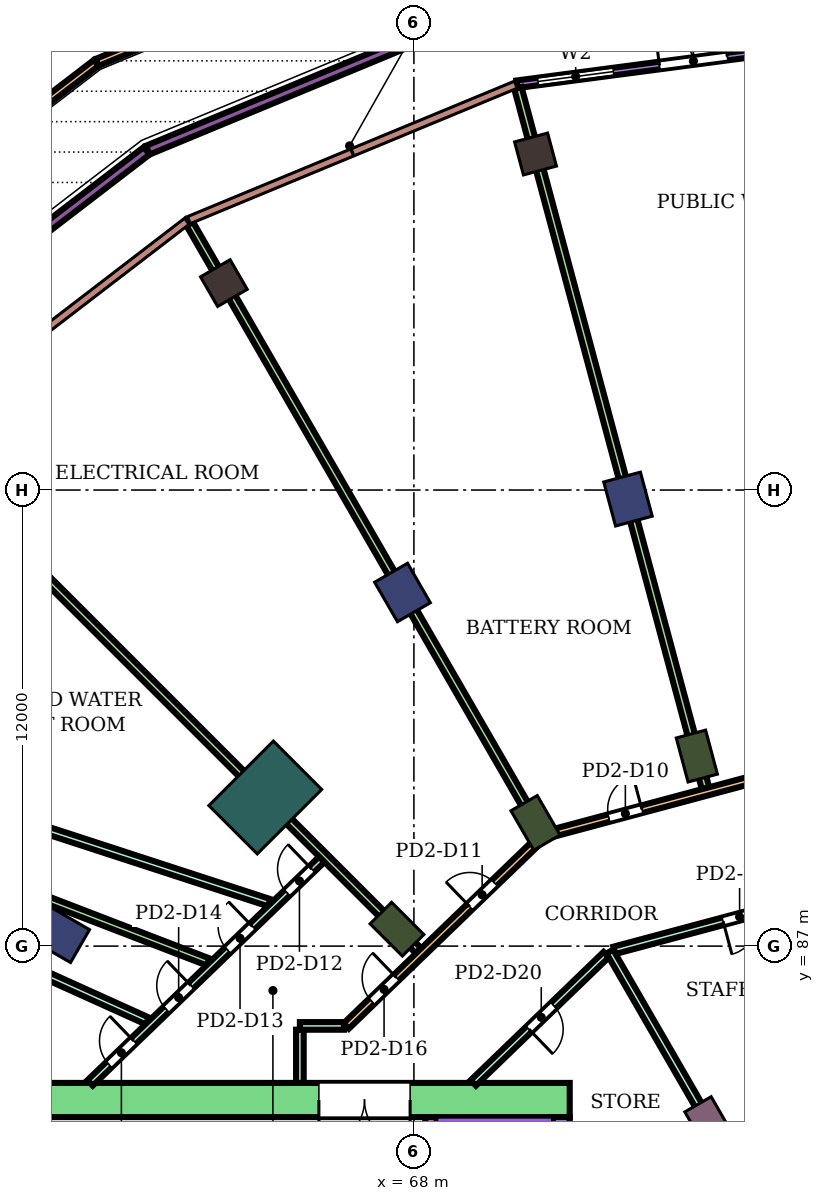
"""IFC4 building model, lengths in metres.
Left out: names, types, materials, properties, quantities, classifications, styles, units other than length and angle.
Written with IfcOpenShell. Run it as: python <this file> out.ifc"""

import sys

from ifc_helpers import new_model, si_unit, direction, frame, frame_2d, origin, origin_2d, place, context, subcontext, project, spatial, rectangle, extrude, element, fill, save


model = new_model("IFC4")
c1 = context("Model", 3, precision=1e-05, world=origin(), true_north=direction((0.0, 1.0)))
c2 = subcontext(c1, "Body", "Model", "MODEL_VIEW")
j1 = project(units=[si_unit("LENGTHUNIT", "METRE"), si_unit("PLANEANGLEUNIT", "RADIAN")], contexts=[c1])
p1 = place(None, origin())
s1 = spatial("IfcSite", under=j1, at=p1, CompositionType="ELEMENT")
p2 = place(p1, origin())
s2 = spatial("IfcBuilding", under=s1, at=p2, CompositionType="ELEMENT")
p3 = place(p2, frame((0.0, 0.0, 12.4)))
s3 = spatial("IfcBuildingStorey", under=s2, at=p3, CompositionType="ELEMENT", Elevation=12.4)
for number, where, z_axis, x_axis in (
    (1, (71.2, 107.842, 0.0), (0.0, 0.0, 1.0), (-0.259, 0.966, 0.0)),
    (2, (63.0, 104.445, 0.0), (0.0, 0.0, 1.0), (-0.5, 0.866, 0.0)),
):
    element("IfcColumn", number, at=place(p3, frame(where, z_axis=z_axis, x_axis=x_axis)), inside=s3, PredefinedType="COLUMN", context=c2, shape_type="SweptSolid", body=[
        extrude(rectangle(XDim=0.9, YDim=0.9, at=origin_2d()), origin(), (0.0, 0.0, 1.0), 5.4),
    ])
for number, where, z_axis, x_axis in (
    (3, (73.633, 98.762, 0.0), (0.0, 0.0, 1.0), (-0.259, 0.966, 0.0)),
    (4, (67.7, 96.304, 0.0), (0.0, 0.0, 1.0), (-0.5, 0.866, 0.0)),
    (5, (58.696, 87.3, 0.0), (0.0, 0.0, 1.0), (-0.866, 0.5, 0.0)),
):
    element("IfcColumn", number, at=place(p3, frame(where, z_axis=z_axis, x_axis=x_axis)), inside=s3, PredefinedType="COLUMN", context=c2, shape_type="SweptSolid", body=[
        extrude(rectangle(XDim=1.2, YDim=1.0, at=origin_2d()), origin(), (0.0, 0.0, 1.0), 5.4),
    ])
for number, where, z_axis, x_axis in (
    (6, (75.445, 92.0, 0.0), (0.0, 0.0, 1.0), (-0.259, 0.966, 0.0)),
    (7, (71.2, 90.242, 0.0), (0.0, 0.0, 1.0), (-0.5, 0.866, 0.0)),
    (8, (67.555, 87.445, 0.0), (0.0, 0.0, 1.0), (-0.707, 0.707, 0.0)),
):
    element("IfcColumn", number, at=place(p3, frame(where, z_axis=z_axis, x_axis=x_axis)), inside=s3, PredefinedType="COLUMN", context=c2, shape_type="SweptSolid", body=[
        extrude(rectangle(XDim=1.2, YDim=0.8, at=origin_2d()), origin(), (0.0, 0.0, 1.0), 5.4),
    ])
p4 = place(p3, frame((75.7, 82.448, 0.0), z_axis=(0.0, 0.0, 1.0), x_axis=(-0.5, 0.866025403784, 0.0)))
e9 = element("IfcColumn", 9, at=p4, inside=s3, PredefinedType="COLUMN", context=c2, shape_type="SweptSolid", body=[
    extrude(rectangle(XDim=0.9, YDim=0.8, at=origin_2d()), origin(), (0.0, 0.0, 1.0), 5.4),
])
p5 = place(p3, frame((64.09, 90.91, 0.0), z_axis=(0.0, 0.0, 1.0), x_axis=(-0.707106781187, 0.707106781187, 0.0)))
e10 = element("IfcColumn", 10, at=p5, inside=s3, PredefinedType="COLUMN", context=c2, shape_type="SweptSolid", body=[
    extrude(rectangle(XDim=1.8, YDim=2.4, at=origin_2d()), origin(), (0.0, 0.0, 1.0), 5.4),
])
p6 = place(p3, frame((72.1, 82.95, 0.0), z_axis=(0.0, 0.0, 1.0), x_axis=(-1.0, 0.0, 0.0)))
e11 = element("IfcWall", 11, at=p6, inside=s3, PredefinedType="SHEAR", context=c2, shape_type="SweptSolid", body=[
    extrude(rectangle(XDim=14.6, YDim=0.9, at=frame_2d((7.3, 0.0))), origin(), (0.0, 0.0, 1.0), 4.95),
])
p7 = place(p6, frame((4.2, 0.0, 0.0)))
e12 = element("IfcOpeningElement", 12, at=p7, cuts=e11, PredefinedType="OPENING", context=c2, shape_type="SweptSolid", body=[
    extrude(rectangle(XDim=2.4, YDim=2.4, at=frame_2d((1.2, 1.2))), frame((0.0, 0.46, 0.0), z_axis=(0.0, -1.0, 0.0), x_axis=(1.0, 0.0, 0.0)), (0.0, 0.0, 1.0), 0.92),
])
p8 = place(p3, frame((71.875, 82.5, 0.0), z_axis=(0.0, 0.0, 1.0), x_axis=(0.0, -1.0, 0.0)))
e13 = element("IfcWall", 13, at=p8, inside=s3, PredefinedType="SHEAR", context=c2, shape_type="SweptSolid", body=[
    extrude(rectangle(XDim=7.5, YDim=0.45, at=frame_2d((3.75, 0.0))), origin(), (0.0, 0.0, 1.0), 4.95),
])
p9 = place(p3, frame((68.45, 82.5, 0.0), z_axis=(0.0, 0.0, 1.0), x_axis=(0.0, -1.0, 0.0)))
e14 = element("IfcWall", 14, at=p9, inside=s3, PredefinedType="SHEAR", context=c2, shape_type="SweptSolid", body=[
    extrude(rectangle(XDim=7.5, YDim=0.3, at=frame_2d((3.75, 0.0))), origin(), (0.0, 0.0, 1.0), 4.95),
])
p10 = place(p9, frame((0.15, 0.0, 0.0)))
e15 = element("IfcOpeningElement", 15, at=p10, cuts=e14, PredefinedType="OPENING", context=c2, shape_type="SweptSolid", body=[
    extrude(rectangle(XDim=0.9, YDim=2.1, at=frame_2d((0.45, 1.05))), frame((0.0, 0.16, 0.0), z_axis=(0.0, -1.0, 0.0), x_axis=(1.0, 0.0, 0.0)), (0.0, 0.0, 1.0), 0.32),
])
p11 = place(p3, frame((80.0, 110.899, 0.0), z_axis=(0.0, 0.0, 1.0), x_axis=(-0.99144586971, -0.130518532918, 0.0)))
e16 = element("IfcWall", 16, at=p11, inside=s3, PredefinedType="NOTDEFINED", context=c2, shape_type="SweptSolid", body=[
    extrude(rectangle(XDim=9.371, YDim=0.2, at=frame_2d((4.686, 0.0))), origin(), (0.0, 0.0, 1.0), 5.4),
])
p12 = place(p11, frame((0.562, 0.0, 0.9)))
e17 = element("IfcOpeningElement", 17, at=p12, cuts=e16, PredefinedType="OPENING", context=c2, shape_type="SweptSolid", body=[
    extrude(rectangle(XDim=2.0, YDim=2.4, at=frame_2d((1.0, 1.2))), frame((0.0, 0.11, 0.0), z_axis=(0.0, -1.0, 0.0), x_axis=(1.0, 0.0, 0.0)), (0.0, 0.0, 1.0), 0.22),
])
p13 = place(p11, frame((3.786, 0.0, 0.0)))
e18 = element("IfcOpeningElement", 18, at=p13, cuts=e16, PredefinedType="OPENING", context=c2, shape_type="SweptSolid", body=[
    extrude(rectangle(XDim=1.8, YDim=2.4, at=frame_2d((0.9, 1.2))), frame((0.0, 0.11, 0.0), z_axis=(0.0, -1.0, 0.0), x_axis=(1.0, 0.0, 0.0)), (0.0, 0.0, 1.0), 0.22),
])
p14 = place(p11, frame((6.81, 0.0, 0.9)))
e19 = element("IfcOpeningElement", 19, at=p14, cuts=e16, PredefinedType="OPENING", context=c2, shape_type="SweptSolid", body=[
    extrude(rectangle(XDim=2.0, YDim=2.4, at=frame_2d((1.0, 1.2))), frame((0.0, 0.11, 0.0), z_axis=(0.0, -1.0, 0.0), x_axis=(1.0, 0.0, 0.0)), (0.0, 0.0, 1.0), 0.22),
])
p15 = place(p3, frame((80.0, 82.604, 0.0), z_axis=(0.0, 0.0, 1.0), x_axis=(-0.965933654434, -0.258789828301, 0.0)))
e20 = element("IfcWall", 20, at=p15, inside=s3, PredefinedType="NOTDEFINED", context=c2, shape_type="SweptSolid", body=[
    extrude(rectangle(XDim=3.936, YDim=0.2, at=frame_2d((1.968, 0.0))), origin(), (0.0, 0.0, 1.0), 5.4),
])
p16 = place(p15, frame((0.468, 0.0, 0.9)))
e21 = element("IfcOpeningElement", 21, at=p16, cuts=e20, PredefinedType="OPENING", context=c2, shape_type="SweptSolid", body=[
    extrude(rectangle(XDim=3.0, YDim=2.3, at=frame_2d((1.5, 1.15))), frame((0.0, 0.11, 0.0), z_axis=(0.0, -1.0, 0.0), x_axis=(1.0, 0.0, 0.0)), (0.0, 0.0, 1.0), 0.22),
])
p17 = place(p3, frame((51.233, 103.785, 0.0), z_axis=(0.0, 0.0, 1.0), x_axis=(0.793353052568, 0.608761803977, 0.0)))
e22 = element("IfcWall", 22, at=p17, inside=s3, PredefinedType="PARAPET", context=c2, shape_type="SweptSolid", body=[
    extrude(rectangle(XDim=10.598, YDim=0.2, at=frame_2d((5.299, 0.0))), origin(), (0.0, 0.0, 1.0), 1.1),
])
p18 = place(p3, frame((59.664, 110.25, 0.0), z_axis=(0.0, 0.0, 1.0), x_axis=(0.923876443197, 0.382690890544, 0.0)))
e23 = element("IfcWall", 23, at=p18, inside=s3, PredefinedType="PARAPET", context=c2, shape_type="SweptSolid", body=[
    extrude(rectangle(XDim=10.598, YDim=0.2, at=frame_2d((5.299, 0.0))), origin(), (0.0, 0.0, 1.0), 1.1),
])
p19 = place(p3, frame((53.107, 101.893, 0.0), z_axis=(0.0, 0.0, 1.0), x_axis=(0.793360504872, 0.608752091832, 0.0)))
e24 = element("IfcWall", 24, at=p19, inside=s3, PredefinedType="USERDEFINED", context=c2, shape_type="SweptSolid", body=[
    extrude(rectangle(XDim=9.912, YDim=0.25, at=frame_2d((4.956, 0.0))), origin(), (0.0, 0.0, 1.0), 0.6),
])
p20 = place(p3, frame((60.999, 107.943, 0.0), z_axis=(0.0, 0.0, 1.0), x_axis=(0.923880014619, 0.382682268453, 0.0)))
e25 = element("IfcWall", 25, at=p20, inside=s3, PredefinedType="USERDEFINED", context=c2, shape_type="SweptSolid", body=[
    extrude(rectangle(XDim=9.896, YDim=0.25, at=frame_2d((4.948, 0.0))), origin(), (0.0, 0.0, 1.0), 0.6),
])
p21 = place(p3, frame((48.142, 90.833, 0.0), z_axis=(0.0, 0.0, 1.0), x_axis=(0.911298050864, -0.411747328457, 0.0)))
e26 = element("IfcWall", 26, at=p21, inside=s3, PredefinedType="PARTITIONING", context=c2, shape_type="SweptSolid", body=[
    extrude(rectangle(XDim=14.092, YDim=0.2, at=frame_2d((7.046, 0.0))), origin(), (0.0, 0.0, 1.0), 4.95),
])
p22 = place(p3, frame((48.609, 91.963, 0.0), z_axis=(0.0, 0.0, 1.0), x_axis=(0.933254810485, -0.35921505913, 0.0)))
e27 = element("IfcWall", 27, at=p22, inside=s3, PredefinedType="PARTITIONING", context=c2, shape_type="SweptSolid", body=[
    extrude(rectangle(XDim=14.974, YDim=0.2, at=frame_2d((7.487, 0.0))), origin(), (0.0, 0.0, 1.0), 3.75),
])
p23 = place(p3, frame((49.063, 93.069, 0.0), z_axis=(0.0, 0.0, 1.0), x_axis=(0.950854727446, -0.309637348026, 0.0)))
e28 = element("IfcWall", 28, at=p23, inside=s3, PredefinedType="PARTITIONING", context=c2, shape_type="SweptSolid", body=[
    extrude(rectangle(XDim=15.911, YDim=0.2, at=frame_2d((7.955, 0.0))), origin(), (0.0, 0.0, 1.0), 4.95),
])
p24 = place(p3, frame((54.687, 100.313, 0.0), z_axis=(0.0, 0.0, 1.0), x_axis=(0.707106781187, -0.707106781187, 0.0)))
e29 = element("IfcWall", 29, at=p24, inside=s3, PredefinedType="PARTITIONING", context=c2, shape_type="SweptSolid", body=[
    extrude(rectangle(XDim=18.994, YDim=0.2, at=frame_2d((9.497, 0.0))), origin(), (0.0, 0.0, 1.0), 3.75),
])
p25 = place(p3, frame((59.48, 83.4, 0.0), z_axis=(0.0, 0.0, 1.0), x_axis=(0.719688438314, 0.694297163869, 0.0)))
e30 = element("IfcWall", 30, at=p25, inside=s3, PredefinedType="PARTITIONING", context=c2, shape_type="SweptSolid", body=[
    extrude(rectangle(XDim=8.471, YDim=0.2, at=frame_2d((4.235, 0.0))), origin(), (0.0, 0.0, 1.0), 4.95),
])
p26 = place(p25, frame((7.204, 0.0, 0.0)))
e31 = element("IfcOpeningElement", 31, at=p26, cuts=e30, PredefinedType="OPENING", context=c2, shape_type="SweptSolid", body=[
    extrude(rectangle(XDim=0.9, YDim=2.1, at=frame_2d((0.45, 1.05))), frame((0.0, 0.11, 0.0), z_axis=(0.0, -1.0, 0.0), x_axis=(1.0, 0.0, 0.0)), (0.0, 0.0, 1.0), 0.22),
])
p27 = place(p25, frame((5.032, 0.0, 0.0)))
e32 = element("IfcOpeningElement", 32, at=p27, cuts=e30, PredefinedType="OPENING", context=c2, shape_type="SweptSolid", body=[
    extrude(rectangle(XDim=0.9, YDim=2.1, at=frame_2d((0.45, 1.05))), frame((0.0, 0.11, 0.0), z_axis=(0.0, -1.0, 0.0), x_axis=(1.0, 0.0, 0.0)), (0.0, 0.0, 1.0), 0.22),
])
p28 = place(p25, frame((2.787, 0.0, 0.0)))
e33 = element("IfcOpeningElement", 33, at=p28, cuts=e30, PredefinedType="OPENING", context=c2, shape_type="SweptSolid", body=[
    extrude(rectangle(XDim=0.9, YDim=2.1, at=frame_2d((0.45, 1.05))), frame((0.0, 0.11, 0.0), z_axis=(0.0, -1.0, 0.0), x_axis=(1.0, 0.0, 0.0)), (0.0, 0.0, 1.0), 0.22),
])
p29 = place(p25, frame((0.694, 0.0, 0.0)))
e34 = element("IfcOpeningElement", 34, at=p29, cuts=e30, PredefinedType="OPENING", context=c2, shape_type="SweptSolid", body=[
    extrude(rectangle(XDim=0.9, YDim=2.1, at=frame_2d((0.45, 1.05))), frame((0.0, 0.11, 0.0), z_axis=(0.0, -1.0, 0.0), x_axis=(1.0, 0.0, 0.0)), (0.0, 0.0, 1.0), 0.22),
])
p30 = place(p3, frame((62.102, 106.003, 0.0), z_axis=(0.0, 0.0, 1.0), x_axis=(0.499973437523, -0.866040739095, 0.0)))
e35 = element("IfcWall", 35, at=p30, inside=s3, PredefinedType="PARTITIONING", context=c2, shape_type="SweptSolid", body=[
    extrude(rectangle(XDim=18.497, YDim=0.2, at=frame_2d((9.248, 0.0))), origin(), (0.0, 0.0, 1.0), 3.75),
])
p31 = place(p3, frame((65.0, 83.401, 0.0), z_axis=(0.0, 0.0, 1.0), x_axis=(0.0, 1.0, 0.0)))
e36 = element("IfcWall", 36, at=p31, inside=s3, PredefinedType="PARTITIONING", context=c2, shape_type="SweptSolid", body=[
    extrude(rectangle(XDim=1.399, YDim=0.2, at=frame_2d((0.7, 0.0))), origin(), (0.0, 0.0, 1.0), 4.95),
])
p32 = place(p3, frame((65.0, 84.9, 0.0), z_axis=(0.0, 0.0, 1.0), x_axis=(1.0, 0.0, 0.0)))
e37 = element("IfcWall", 37, at=p32, inside=s3, PredefinedType="PARTITIONING", context=c2, shape_type="SweptSolid", body=[
    extrude(rectangle(XDim=1.16, YDim=0.2, at=frame_2d((0.58, 0.0))), origin(), (0.0, 0.0, 1.0), 4.95),
])
p33 = place(p3, frame((66.22, 84.9, 0.0), z_axis=(0.0, 0.0, 1.0), x_axis=(0.719621348931, 0.694366700068, 0.0)))
e38 = element("IfcWall", 38, at=p33, inside=s3, PredefinedType="PARTITIONING", context=c2, shape_type="SweptSolid", body=[
    extrude(rectangle(XDim=7.173, YDim=0.2, at=frame_2d((3.586, 0.0))), origin(), (0.0, 0.0, 1.0), 4.45),
])
p34 = place(p33, frame((4.519, 0.0, 0.0)))
e39 = element("IfcOpeningElement", 39, at=p34, cuts=e38, PredefinedType="OPENING", context=c2, shape_type="SweptSolid", body=[
    extrude(rectangle(XDim=0.9, YDim=2.1, at=frame_2d((0.45, 1.05))), frame((0.0, 0.11, 0.0), z_axis=(0.0, -1.0, 0.0), x_axis=(1.0, 0.0, 0.0)), (0.0, 0.0, 1.0), 0.22),
])
p35 = place(p33, frame((0.932, 0.0, 0.0)))
e40 = element("IfcOpeningElement", 40, at=p35, cuts=e38, PredefinedType="OPENING", context=c2, shape_type="SweptSolid", body=[
    extrude(rectangle(XDim=0.9, YDim=2.1, at=frame_2d((0.45, 1.05))), frame((0.0, 0.11, 0.0), z_axis=(0.0, -1.0, 0.0), x_axis=(1.0, 0.0, 0.0)), (0.0, 0.0, 1.0), 0.22),
])
p36 = place(p3, frame((69.563, 83.4, 0.0), z_axis=(0.0, 0.0, 1.0), x_axis=(0.719454254864, 0.694539829785, 0.0)))
e41 = element("IfcWall", 41, at=p36, inside=s3, PredefinedType="PARTITIONING", context=c2, shape_type="SweptSolid", body=[
    extrude(rectangle(XDim=4.86, YDim=0.2, at=frame_2d((2.43, 0.0))), origin(), (0.0, 0.0, 1.0), 4.95),
])
p37 = place(p36, frame((2.035, 0.0, 0.0)))
e42 = element("IfcOpeningElement", 42, at=p37, cuts=e41, PredefinedType="OPENING", context=c2, shape_type="SweptSolid", body=[
    extrude(rectangle(XDim=0.9, YDim=2.1, at=frame_2d((0.45, 1.05))), frame((0.0, 0.11, 0.0), z_axis=(0.0, -1.0, 0.0), x_axis=(1.0, 0.0, 0.0)), (0.0, 0.0, 1.0), 0.22),
])
p38 = place(p3, frame((70.737, 109.579, 0.0), z_axis=(0.0, 0.0, 1.0), x_axis=(0.258776177531, -0.965937311601, 0.0)))
e43 = element("IfcWall", 43, at=p38, inside=s3, PredefinedType="PARTITIONING", context=c2, shape_type="SweptSolid", body=[
    extrude(rectangle(XDim=19.074, YDim=0.2, at=frame_2d((9.537, 0.0))), origin(), (0.0, 0.0, 1.0), 3.75),
])
p39 = place(p3, frame((71.411, 89.908, 0.0), z_axis=(0.0, 0.0, 1.0), x_axis=(0.965907314361, 0.258888122678, 0.0)))
e44 = element("IfcWall", 44, at=p39, inside=s3, PredefinedType="PARTITIONING", context=c2, shape_type="SweptSolid", body=[
    extrude(rectangle(XDim=8.802, YDim=0.2, at=frame_2d((4.401, 0.0))), origin(), (0.0, 0.0, 1.0), 4.45),
])
p40 = place(p39, frame((6.205, 0.0, 0.0)))
e45 = element("IfcOpeningElement", 45, at=p40, cuts=e44, PredefinedType="OPENING", context=c2, shape_type="SweptSolid", body=[
    extrude(rectangle(XDim=0.9, YDim=2.1, at=frame_2d((0.45, 1.05))), frame((0.0, 0.11, 0.0), z_axis=(0.0, -1.0, 0.0), x_axis=(1.0, 0.0, 0.0)), (0.0, 0.0, 1.0), 0.22),
])
p41 = place(p39, frame((1.779, 0.0, 0.0)))
e46 = element("IfcOpeningElement", 46, at=p41, cuts=e44, PredefinedType="OPENING", context=c2, shape_type="SweptSolid", body=[
    extrude(rectangle(XDim=0.9, YDim=2.1, at=frame_2d((0.45, 1.05))), frame((0.0, 0.11, 0.0), z_axis=(0.0, -1.0, 0.0), x_axis=(1.0, 0.0, 0.0)), (0.0, 0.0, 1.0), 0.22),
])
p42 = place(p3, frame((73.274, 86.888, 0.0), z_axis=(0.0, 0.0, 1.0), x_axis=(0.965941353683, 0.258761089124, 0.0)))
e47 = element("IfcWall", 47, at=p42, inside=s3, PredefinedType="PARTITIONING", context=c2, shape_type="SweptSolid", body=[
    extrude(rectangle(XDim=6.833, YDim=0.2, at=frame_2d((3.417, 0.0))), origin(), (0.0, 0.0, 1.0), 4.95),
])
p43 = place(p42, frame((2.961, 0.0, 0.0)))
e48 = element("IfcOpeningElement", 48, at=p43, cuts=e47, PredefinedType="OPENING", context=c2, shape_type="SweptSolid", body=[
    extrude(rectangle(XDim=0.9, YDim=2.1, at=frame_2d((0.45, 1.05))), frame((0.0, 0.11, 0.0), z_axis=(0.0, -1.0, 0.0), x_axis=(1.0, 0.0, 0.0)), (0.0, 0.0, 1.0), 0.22),
])
p44 = place(p3, frame((73.155, 86.856, 0.0), z_axis=(0.0, 0.0, 1.0), x_axis=(0.499951716245, -0.866053278629, 0.0)))
e49 = element("IfcWall", 49, at=p44, inside=s3, PredefinedType="PARTITIONING", context=c2, shape_type="SweptSolid", body=[
    extrude(rectangle(XDim=5.992, YDim=0.2, at=frame_2d((2.996, 0.0))), origin(), (0.0, 0.0, 1.0), 4.95),
])
p45 = place(p13, frame((1.8, 0.0, 0.0), z_axis=(0.0, 0.0, 1.0), x_axis=(-1.0, 0.0, 0.0)))
e50 = element("IfcDoor", 50, at=p45, inside=s3, OperationType="DOUBLE_DOOR_SINGLE_SWING", PredefinedType="DOOR", context=c2, shape_type="SweptSolid", body=[
    extrude(rectangle(XDim=1.8, YDim=2.4, at=frame_2d((0.9, 1.2))), frame((0.0, 0.025, 0.0), z_axis=(0.0, -1.0, 0.0), x_axis=(1.0, 0.0, 0.0)), (0.0, 0.0, 1.0), 0.05),
])
fill(e18, e50)
p46 = place(p14, origin())
e51 = element("IfcWindow", 51, at=p46, inside=s3, PartitioningType="SINGLE_PANEL", PredefinedType="WINDOW", context=c2, shape_type="SweptSolid", body=[
    extrude(rectangle(XDim=2.0, YDim=2.4, at=frame_2d((1.0, 1.2))), frame((0.0, 0.03, 0.0), z_axis=(0.0, -1.0, 0.0), x_axis=(1.0, 0.0, 0.0)), (0.0, 0.0, 1.0), 0.06),
])
fill(e19, e51)
p47 = place(p16, origin())
e52 = element("IfcWindow", 52, at=p47, inside=s3, PartitioningType="SINGLE_PANEL", PredefinedType="WINDOW", context=c2, shape_type="SweptSolid", body=[
    extrude(rectangle(XDim=3.0, YDim=2.3, at=frame_2d((1.5, 1.15))), frame((0.0, 0.03, 0.0), z_axis=(0.0, -1.0, 0.0), x_axis=(1.0, 0.0, 0.0)), (0.0, 0.0, 1.0), 0.06),
])
fill(e21, e52)
p48 = place(p41, origin())
e53 = element("IfcDoor", 53, at=p48, inside=s3, OperationType="SINGLE_SWING_RIGHT", PredefinedType="DOOR", context=c2, shape_type="SweptSolid", body=[
    extrude(rectangle(XDim=0.9, YDim=2.1, at=frame_2d((0.45, 1.05))), frame((0.0, 0.025, 0.0), z_axis=(0.0, -1.0, 0.0), x_axis=(1.0, 0.0, 0.0)), (0.0, 0.0, 1.0), 0.05),
])
fill(e46, e53)
p49 = place(p34, origin())
e54 = element("IfcDoor", 54, at=p49, inside=s3, OperationType="SINGLE_SWING_LEFT", PredefinedType="DOOR", context=c2, shape_type="SweptSolid", body=[
    extrude(rectangle(XDim=0.9, YDim=2.1, at=frame_2d((0.45, 1.05))), frame((0.0, 0.025, 0.0), z_axis=(0.0, -1.0, 0.0), x_axis=(1.0, 0.0, 0.0)), (0.0, 0.0, 1.0), 0.05),
])
fill(e39, e54)
p50 = place(p26, origin())
e55 = element("IfcDoor", 55, at=p50, inside=s3, OperationType="SINGLE_SWING_RIGHT", PredefinedType="DOOR", context=c2, shape_type="SweptSolid", body=[
    extrude(rectangle(XDim=0.9, YDim=2.1, at=frame_2d((0.45, 1.05))), frame((0.0, 0.025, 0.0), z_axis=(0.0, -1.0, 0.0), x_axis=(1.0, 0.0, 0.0)), (0.0, 0.0, 1.0), 0.05),
])
fill(e31, e55)
p51 = place(p27, origin())
e56 = element("IfcDoor", 56, at=p51, inside=s3, OperationType="SINGLE_SWING_RIGHT", PredefinedType="DOOR", context=c2, shape_type="SweptSolid", body=[
    extrude(rectangle(XDim=0.9, YDim=2.1, at=frame_2d((0.45, 1.05))), frame((0.0, 0.025, 0.0), z_axis=(0.0, -1.0, 0.0), x_axis=(1.0, 0.0, 0.0)), (0.0, 0.0, 1.0), 0.05),
])
fill(e32, e56)
p52 = place(p28, origin())
e57 = element("IfcDoor", 57, at=p52, inside=s3, OperationType="SINGLE_SWING_RIGHT", PredefinedType="DOOR", context=c2, shape_type="SweptSolid", body=[
    extrude(rectangle(XDim=0.9, YDim=2.1, at=frame_2d((0.45, 1.05))), frame((0.0, 0.025, 0.0), z_axis=(0.0, -1.0, 0.0), x_axis=(1.0, 0.0, 0.0)), (0.0, 0.0, 1.0), 0.05),
])
fill(e33, e57)
p53 = place(p29, origin())
e58 = element("IfcDoor", 58, at=p53, inside=s3, OperationType="SINGLE_SWING_RIGHT", PredefinedType="DOOR", context=c2, shape_type="SweptSolid", body=[
    extrude(rectangle(XDim=0.9, YDim=2.1, at=frame_2d((0.45, 1.05))), frame((0.0, 0.025, 0.0), z_axis=(0.0, -1.0, 0.0), x_axis=(1.0, 0.0, 0.0)), (0.0, 0.0, 1.0), 0.05),
])
fill(e34, e58)
p54 = place(p35, origin())
e59 = element("IfcDoor", 59, at=p54, inside=s3, OperationType="SINGLE_SWING_RIGHT", PredefinedType="DOOR", context=c2, shape_type="SweptSolid", body=[
    extrude(rectangle(XDim=0.9, YDim=2.1, at=frame_2d((0.45, 1.05))), frame((0.0, 0.025, 0.0), z_axis=(0.0, -1.0, 0.0), x_axis=(1.0, 0.0, 0.0)), (0.0, 0.0, 1.0), 0.05),
])
fill(e40, e59)
p55 = place(p43, frame((0.9, 0.0, 0.0), z_axis=(0.0, 0.0, 1.0), x_axis=(-1.0, 0.0, 0.0)))
e60 = element("IfcDoor", 60, at=p55, inside=s3, OperationType="SINGLE_SWING_RIGHT", PredefinedType="DOOR", context=c2, shape_type="SweptSolid", body=[
    extrude(rectangle(XDim=0.9, YDim=2.1, at=frame_2d((0.45, 1.05))), frame((0.0, 0.025, 0.0), z_axis=(0.0, -1.0, 0.0), x_axis=(1.0, 0.0, 0.0)), (0.0, 0.0, 1.0), 0.05),
])
fill(e48, e60)
p56 = place(p37, frame((0.9, 0.0, 0.0), z_axis=(0.0, 0.0, 1.0), x_axis=(-1.0, 0.0, 0.0)))
e61 = element("IfcDoor", 61, at=p56, inside=s3, OperationType="SINGLE_SWING_RIGHT", PredefinedType="DOOR", context=c2, shape_type="SweptSolid", body=[
    extrude(rectangle(XDim=0.9, YDim=2.1, at=frame_2d((0.45, 1.05))), frame((0.0, 0.025, 0.0), z_axis=(0.0, -1.0, 0.0), x_axis=(1.0, 0.0, 0.0)), (0.0, 0.0, 1.0), 0.05),
])
fill(e42, e61)
p57 = place(p7, origin())
e62 = element("IfcDoor", 62, at=p57, inside=s3, OperationType="DOUBLE_DOOR_SINGLE_SWING", PredefinedType="DOOR", context=c2, shape_type="SweptSolid", body=[
    extrude(rectangle(XDim=2.4, YDim=2.4, at=frame_2d((1.2, 1.2))), frame((0.0, 0.025, 0.0), z_axis=(0.0, -1.0, 0.0), x_axis=(1.0, 0.0, 0.0)), (0.0, 0.0, 1.0), 0.05),
])
fill(e12, e62)
save(model, sys.argv[1])
